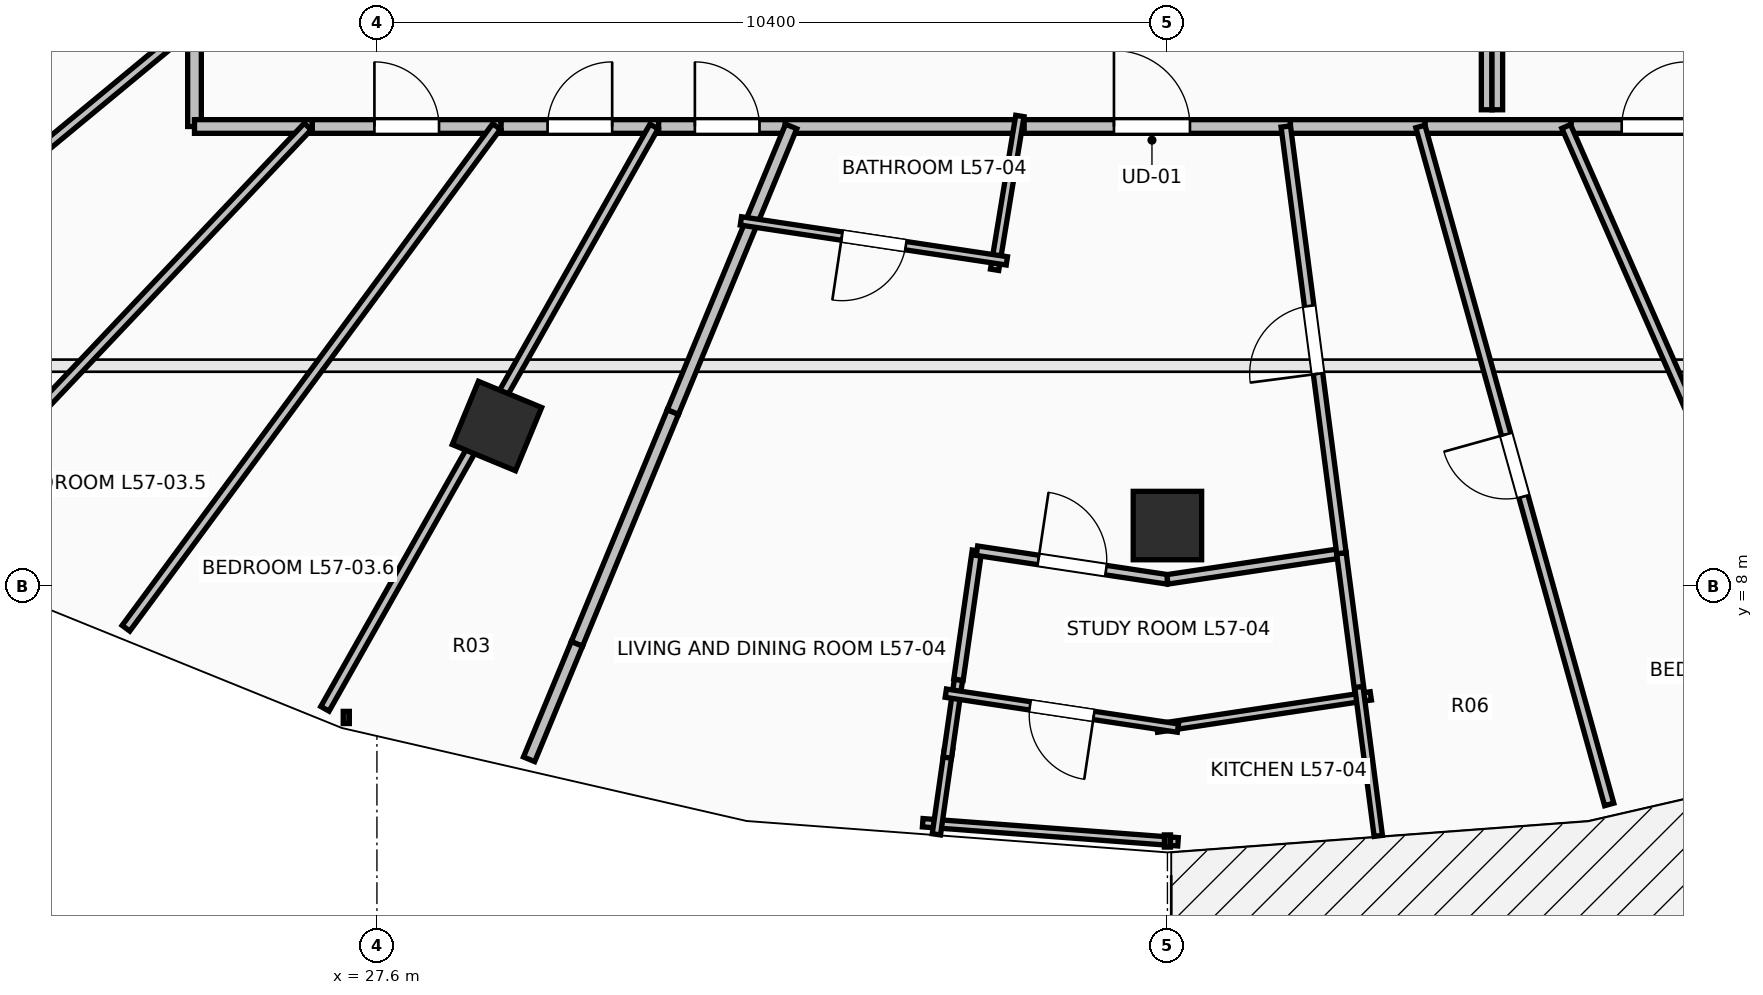
"""IFC4 building model, lengths in metres.
Left out: names, types, materials, properties, quantities, classifications, styles, units other than length and angle.
Written with IfcOpenShell. Run it as: python <this file> out.ifc"""

import sys

from ifc_helpers import new_model, si_unit, direction, frame, frame_2d, origin, origin_2d, place, context, subcontext, project, spatial, rectangle, extrude, element, fill, save


model = new_model("IFC4")
c1 = context("Model", 3, precision=1e-05, world=origin(), true_north=direction((0.0, 1.0)))
c2 = subcontext(c1, "Body", "Model", "MODEL_VIEW")
j1 = project(units=[si_unit("LENGTHUNIT", "METRE"), si_unit("PLANEANGLEUNIT", "RADIAN")], contexts=[c1])
p1 = place(None, origin())
s1 = spatial("IfcSite", under=j1, at=p1, CompositionType="ELEMENT")
p2 = place(p1, origin())
s2 = spatial("IfcBuilding", under=s1, at=p2, CompositionType="ELEMENT")
p3 = place(p2, frame((0.0, 0.0, 210.75)))
s3 = spatial("IfcBuildingStorey", under=s2, at=p3, CompositionType="ELEMENT", Elevation=210.75)
for number, where, z_axis, x_axis in (
    (1, (29.179, 10.109, 0.0), (0.0, 0.0, 1.0), (-0.383, -0.924, 0.0)),
    (2, (38.0, 8.8, 0.0), (0.0, 0.0, 1.0), (0.0, -1.0, 0.0)),
):
    element("IfcColumn", number, at=place(p3, frame(where, z_axis=z_axis, x_axis=x_axis)), inside=s3, PredefinedType="COLUMN", context=c2, shape_type="SweptSolid", body=[
        extrude(rectangle(XDim=0.9, YDim=0.9, at=origin_2d()), origin(), (0.0, 0.0, 1.0), 3.55),
    ])
p4 = place(p3, frame((25.2, 15.333, 0.0), z_axis=(0.0, 0.0, 1.0), x_axis=(0.0, -1.0, 0.0)))
e3 = element("IfcWall", 3, at=p4, inside=s3, PredefinedType="PARTITIONING", context=c2, shape_type="SweptSolid", body=[
    extrude(rectangle(XDim=1.283, YDim=0.18, at=frame_2d((0.642, 0.0))), origin(), (0.0, 0.0, 1.0), 2.482),
])
p5 = place(p3, frame((25.2, 14.05, 0.0), z_axis=(0.0, 0.0, 1.0), x_axis=(1.0, 0.0, 0.0)))
e4 = element("IfcWall", 4, at=p5, inside=s3, PredefinedType="PARTITIONING", context=c2, shape_type="SweptSolid", body=[
    extrude(rectangle(XDim=1.55, YDim=0.18, at=frame_2d((0.775, 0.0))), origin(), (0.0, 0.0, 1.0), 2.936),
])
p6 = place(p3, frame((26.75, 14.05, 0.0), z_axis=(0.0, 0.0, 1.0), x_axis=(1.0, 0.0, 0.0)))
e5 = element("IfcWall", 5, at=p6, inside=s3, PredefinedType="PARTITIONING", context=c2, shape_type="SweptSolid", body=[
    extrude(rectangle(XDim=2.484, YDim=0.18, at=frame_2d((1.242, 0.0))), origin(), (0.0, 0.0, 1.0), 2.482),
])
p7 = place(p6, frame((0.817, 0.0, 0.0)))
e6 = element("IfcOpeningElement", 6, at=p7, cuts=e5, PredefinedType="OPENING", context=c2, shape_type="SweptSolid", body=[
    extrude(rectangle(XDim=0.85, YDim=2.1, at=frame_2d((0.425, 1.05))), frame((0.0, 0.105, 0.0), z_axis=(0.0, -1.0, 0.0), x_axis=(1.0, 0.0, 0.0)), (0.0, 0.0, 1.0), 0.21),
])
p8 = place(p3, frame((29.234, 14.05, 0.0), z_axis=(0.0, 0.0, 1.0), x_axis=(1.0, 0.0, 0.0)))
e7 = element("IfcWall", 7, at=p8, inside=s3, PredefinedType="PARTITIONING", context=c2, shape_type="SweptSolid", body=[
    extrude(rectangle(XDim=2.072, YDim=0.18, at=frame_2d((1.036, 0.0))), origin(), (0.0, 0.0, 1.0), 3.29),
])
p9 = place(p8, frame((0.611, 0.0, 0.0)))
e8 = element("IfcOpeningElement", 8, at=p9, cuts=e7, PredefinedType="OPENING", context=c2, shape_type="SweptSolid", body=[
    extrude(rectangle(XDim=0.85, YDim=2.1, at=frame_2d((0.425, 1.05))), frame((0.0, 0.105, 0.0), z_axis=(0.0, -1.0, 0.0), x_axis=(1.0, 0.0, 0.0)), (0.0, 0.0, 1.0), 0.21),
])
p10 = place(p3, frame((31.306, 14.05, 0.0), z_axis=(0.0, 0.0, 1.0), x_axis=(1.0, 0.0, 0.0)))
e9 = element("IfcWall", 9, at=p10, inside=s3, PredefinedType="PARTITIONING", context=c2, shape_type="SweptSolid", body=[
    extrude(rectangle(XDim=1.804, YDim=0.18, at=frame_2d((0.902, 0.0))), origin(), (0.0, 0.0, 1.0), 3.29),
])
p11 = place(p10, frame((0.477, 0.0, 0.0)))
e10 = element("IfcOpeningElement", 10, at=p11, cuts=e9, PredefinedType="OPENING", context=c2, shape_type="SweptSolid", body=[
    extrude(rectangle(XDim=0.85, YDim=2.1, at=frame_2d((0.425, 1.05))), frame((0.0, 0.105, 0.0), z_axis=(0.0, -1.0, 0.0), x_axis=(1.0, 0.0, 0.0)), (0.0, 0.0, 1.0), 0.21),
])
p12 = place(p3, frame((35.975, 14.05, 0.0), z_axis=(0.0, 0.0, 1.0), x_axis=(1.0, 0.0, 0.0)))
e11 = element("IfcWall", 11, at=p12, inside=s3, PredefinedType="PARTITIONING", context=c2, shape_type="SweptSolid", body=[
    extrude(rectangle(XDim=3.643, YDim=0.18, at=frame_2d((1.821, 0.0))), origin(), (0.0, 0.0, 1.0), 2.979),
])
p13 = place(p12, frame((1.322, 0.0, 0.0)))
e12 = element("IfcOpeningElement", 12, at=p13, cuts=e11, PredefinedType="OPENING", context=c2, shape_type="SweptSolid", body=[
    extrude(rectangle(XDim=1.0, YDim=2.15, at=frame_2d((0.5, 1.075))), frame((0.0, 0.105, 0.0), z_axis=(0.0, -1.0, 0.0), x_axis=(1.0, 0.0, 0.0)), (0.0, 0.0, 1.0), 0.21),
])
p14 = place(p3, frame((32.97, 14.05, 0.0), z_axis=(0.0, 0.0, 1.0), x_axis=(1.0, 0.0, 0.0)))
e13 = element("IfcWall", 13, at=p14, inside=s3, PredefinedType="PARTITIONING", context=c2, shape_type="SweptSolid", body=[
    extrude(rectangle(XDim=3.145, YDim=0.18, at=frame_2d((1.573, 0.0))), origin(), (0.0, 0.0, 1.0), 2.979),
])
p15 = place(p3, frame((39.618, 14.05, 0.0), z_axis=(0.0, 0.0, 1.0), x_axis=(1.0, 0.0, 0.0)))
e14 = element("IfcWall", 14, at=p15, inside=s3, PredefinedType="PARTITIONING", context=c2, shape_type="SweptSolid", body=[
    extrude(rectangle(XDim=1.772, YDim=0.18, at=frame_2d((0.886, 0.0))), origin(), (0.0, 0.0, 1.0), 2.979),
])
p16 = place(p3, frame((41.39, 14.05, 0.0), z_axis=(0.0, 0.0, 1.0), x_axis=(1.0, 0.0, 0.0)))
e15 = element("IfcWall", 15, at=p16, inside=s3, PredefinedType="PARTITIONING", context=c2, shape_type="SweptSolid", body=[
    extrude(rectangle(XDim=1.922, YDim=0.18, at=frame_2d((0.961, 0.0))), origin(), (0.0, 0.0, 1.0), 2.979),
])
p17 = place(p3, frame((43.312, 14.05, 0.0), z_axis=(0.0, 0.0, 1.0), x_axis=(1.0, 0.0, 0.0)))
e16 = element("IfcWall", 16, at=p17, inside=s3, PredefinedType="PARTITIONING", context=c2, shape_type="SweptSolid", body=[
    extrude(rectangle(XDim=2.179, YDim=0.18, at=frame_2d((1.089, 0.0))), origin(), (0.0, 0.0, 1.0), 2.482),
])
p18 = place(p17, frame((0.665, 0.0, 0.0)))
e17 = element("IfcOpeningElement", 17, at=p18, cuts=e16, PredefinedType="OPENING", context=c2, shape_type="SweptSolid", body=[
    extrude(rectangle(XDim=0.85, YDim=2.1, at=frame_2d((0.425, 1.05))), frame((0.0, 0.105, 0.0), z_axis=(0.0, -1.0, 0.0), x_axis=(1.0, 0.0, 0.0)), (0.0, 0.0, 1.0), 0.21),
])
p19 = place(p3, frame((14.217, 14.579, 0.0), z_axis=(0.0, 0.0, 1.0), x_axis=(0.901423599975, 0.432938209689, 0.0)))
e18 = element("IfcWall", 18, at=p19, inside=s3, PredefinedType="PARTITIONING", context=c2, shape_type="SweptSolid", body=[
    extrude(rectangle(XDim=12.184, YDim=0.125, at=frame_2d((6.092, 0.0))), origin(), (0.0, 0.0, 1.0), 2.482),
])
p20 = place(p3, frame((16.555, 12.272, 0.0), z_axis=(0.0, 0.0, 1.0), x_axis=(0.842221721565, 0.539131312135, 0.0)))
e19 = element("IfcWall", 19, at=p20, inside=s3, PredefinedType="PARTITIONING", context=c2, shape_type="SweptSolid", body=[
    extrude(rectangle(XDim=10.265, YDim=0.125, at=frame_2d((5.132, 0.0))), origin(), (0.0, 0.0, 1.0), 2.482),
])
p21 = place(p3, frame((19.02, 10.298, 0.0), z_axis=(0.0, 0.0, 1.0), x_axis=(0.770494327523, 0.637446853671, 0.0)))
e20 = element("IfcWall", 20, at=p21, inside=s3, PredefinedType="PARTITIONING", context=c2, shape_type="SweptSolid", body=[
    extrude(rectangle(XDim=8.021, YDim=0.125, at=frame_2d((4.01, 0.0))), origin(), (0.0, 0.0, 1.0), 2.482),
])
p22 = place(p21, frame((2.746, 0.0, 0.0)))
e21 = element("IfcOpeningElement", 21, at=p22, cuts=e20, PredefinedType="OPENING", context=c2, shape_type="SweptSolid", body=[
    extrude(rectangle(XDim=0.85, YDim=2.1, at=frame_2d((0.425, 1.05))), frame((0.0, 0.077, 0.0), z_axis=(0.0, -1.0, 0.0), x_axis=(1.0, 0.0, 0.0)), (0.0, 0.0, 1.0), 0.155),
])
p23 = place(p3, frame((21.613, 8.686, 0.0), z_axis=(0.0, 0.0, 1.0), x_axis=(0.68740257318, 0.726276601844, 0.0)))
e22 = element("IfcWall", 22, at=p23, inside=s3, PredefinedType="PARTITIONING", context=c2, shape_type="SweptSolid", body=[
    extrude(rectangle(XDim=7.386, YDim=0.125, at=frame_2d((3.693, 0.0))), origin(), (0.0, 0.0, 1.0), 2.824),
])
p24 = place(p3, frame((24.298, 7.449, 0.0), z_axis=(0.0, 0.0, 1.0), x_axis=(0.594148459094, 0.804355399408, 0.0)))
e23 = element("IfcWall", 23, at=p24, inside=s3, PredefinedType="PARTITIONING", context=c2, shape_type="SweptSolid", body=[
    extrude(rectangle(XDim=8.207, YDim=0.125, at=frame_2d((4.103, 0.0))), origin(), (0.0, 0.0, 1.0), 2.482),
])
p25 = place(p3, frame((26.916, 6.389, 0.0), z_axis=(0.0, 0.0, 1.0), x_axis=(0.492046286697, 0.870569039047, 0.0)))
e24 = element("IfcWall", 24, at=p25, inside=s3, PredefinedType="PARTITIONING", context=c2, shape_type="SweptSolid", body=[
    extrude(rectangle(XDim=8.8, YDim=0.125, at=frame_2d((4.4, 0.0))), origin(), (0.0, 0.0, 1.0), 2.482),
])
p26 = place(p3, frame((30.231, 7.243, 0.0), z_axis=(0.0, 0.0, 1.0), x_axis=(0.382467158794, 0.923969086303, 0.0)))
e25 = element("IfcWall", 25, at=p26, inside=s3, PredefinedType="PARTITIONING", context=c2, shape_type="SweptSolid", body=[
    extrude(rectangle(XDim=3.302, YDim=0.16, at=frame_2d((1.651, 0.0))), origin(), (0.0, 0.0, 1.0), 2.824),
])
p27 = place(p3, frame((31.494, 10.294, 0.0), z_axis=(0.0, 0.0, 1.0), x_axis=(0.382751310383, 0.923851413594, 0.0)))
e26 = element("IfcWall", 26, at=p27, inside=s3, PredefinedType="PARTITIONING", context=c2, shape_type="SweptSolid", body=[
    extrude(rectangle(XDim=4.066, YDim=0.16, at=frame_2d((2.033, 0.0))), origin(), (0.0, 0.0, 1.0), 2.936),
])
p28 = place(p3, frame((29.602, 5.725, 0.0), z_axis=(0.0, 0.0, 1.0), x_axis=(0.382789247432, 0.923835695376, 0.0)))
e27 = element("IfcWall", 27, at=p28, inside=s3, PredefinedType="PARTITIONING", context=c2, shape_type="SweptSolid", body=[
    extrude(rectangle(XDim=1.643, YDim=0.16, at=frame_2d((0.822, 0.0))), origin(), (0.0, 0.0, 1.0), 3.29),
])
p29 = place(p3, frame((36.059, 14.188, 0.0), z_axis=(0.0, 0.0, 1.0), x_axis=(-0.16206206721, -0.986780566474, 0.0)))
e28 = element("IfcWall", 28, at=p29, inside=s3, PredefinedType="PARTITIONING", context=c2, shape_type="SweptSolid", body=[
    extrude(rectangle(XDim=2.05, YDim=0.11, at=frame_2d((1.025, 0.0))), origin(), (0.0, 0.0, 1.0), 2.936),
])
p30 = place(p3, frame((35.887, 12.282, 0.0), z_axis=(0.0, 0.0, 1.0), x_axis=(-0.988902415317, 0.148566527121, 0.0)))
e29 = element("IfcWall", 29, at=p30, inside=s3, PredefinedType="PARTITIONING", context=c2, shape_type="SweptSolid", body=[
    extrude(rectangle(XDim=3.538, YDim=0.11, at=frame_2d((1.769, 0.0))), origin(), (0.0, 0.0, 1.0), 2.936),
])
p31 = place(p30, frame((1.344, 0.0, 0.0)))
e30 = element("IfcOpeningElement", 30, at=p31, cuts=e29, PredefinedType="OPENING", context=c2, shape_type="SweptSolid", body=[
    extrude(rectangle(XDim=0.85, YDim=2.1, at=frame_2d((0.425, 1.05))), frame((0.0, 0.07, 0.0), z_axis=(0.0, -1.0, 0.0), x_axis=(1.0, 0.0, 0.0)), (0.0, 0.0, 1.0), 0.14),
])
p32 = place(p3, frame((34.781, 4.89, 0.0), z_axis=(0.0, 0.0, 1.0), x_axis=(0.997225868556, -0.07443498561, 0.0)))
e31 = element("IfcWall", 31, at=p32, inside=s3, PredefinedType="PARTITIONING", context=c2, shape_type="SweptSolid", body=[
    extrude(rectangle(XDim=3.368, YDim=0.11, at=frame_2d((1.684, 0.0))), origin(), (0.0, 0.0, 1.0), 3.29),
])
p33 = place(p3, frame((34.96, 4.737, 0.0), z_axis=(0.0, 0.0, 1.0), x_axis=(0.141118797845, 0.989992669112, 0.0)))
e32 = element("IfcWall", 32, at=p33, inside=s3, PredefinedType="PARTITIONING", context=c2, shape_type="SweptSolid", body=[
    extrude(rectangle(XDim=1.13, YDim=0.11, at=frame_2d((0.565, 0.0))), origin(), (0.0, 0.0, 1.0), 3.29),
])
p34 = place(p3, frame((35.104, 5.747, 0.0), z_axis=(0.0, 0.0, 1.0), x_axis=(0.141751551652, 0.989902266693, 0.0)))
e33 = element("IfcWall", 33, at=p34, inside=s3, PredefinedType="PARTITIONING", context=c2, shape_type="SweptSolid", body=[
    extrude(rectangle(XDim=1.035, YDim=0.11, at=frame_2d((0.518, 0.0))), origin(), (0.0, 0.0, 1.0), 3.29),
])
p35 = place(p3, frame((35.251, 6.771, 0.0), z_axis=(0.0, 0.0, 1.0), x_axis=(0.141660537741, 0.98991529539, 0.0)))
e34 = element("IfcWall", 34, at=p35, inside=s3, PredefinedType="PARTITIONING", context=c2, shape_type="SweptSolid", body=[
    extrude(rectangle(XDim=1.715, YDim=0.125, at=frame_2d((0.857, 0.0))), origin(), (0.0, 0.0, 1.0), 3.29),
])
p36 = place(p3, frame((35.494, 8.469, 0.0), z_axis=(0.0, 0.0, 1.0), x_axis=(0.988876209798, -0.148740854158, 0.0)))
e35 = element("IfcWall", 35, at=p36, inside=s3, PredefinedType="PARTITIONING", context=c2, shape_type="SweptSolid", body=[
    extrude(rectangle(XDim=2.534, YDim=0.125, at=frame_2d((1.267, 0.0))), origin(), (0.0, 0.0, 1.0), 3.29),
])
p37 = place(p36, frame((0.817, 0.0, 0.0)))
e36 = element("IfcOpeningElement", 36, at=p37, cuts=e35, PredefinedType="OPENING", context=c2, shape_type="SweptSolid", body=[
    extrude(rectangle(XDim=0.9, YDim=2.1, at=frame_2d((0.45, 1.05))), frame((0.0, 0.077, 0.0), z_axis=(0.0, -1.0, 0.0), x_axis=(1.0, 0.0, 0.0)), (0.0, 0.0, 1.0), 0.155),
])
p38 = place(p3, frame((38.0, 8.092, 0.0), z_axis=(0.0, 0.0, 1.0), x_axis=(0.988896087956, 0.148608637791, 0.0)))
e37 = element("IfcWall", 37, at=p38, inside=s3, PredefinedType="PARTITIONING", context=c2, shape_type="SweptSolid", body=[
    extrude(rectangle(XDim=2.315, YDim=0.125, at=frame_2d((1.157, 0.0))), origin(), (0.0, 0.0, 1.0), 3.29),
])
p39 = place(p3, frame((40.289, 8.436, 0.0), z_axis=(0.0, 0.0, 1.0), x_axis=(0.12959001093, -0.991567662375, 0.0)))
e38 = element("IfcWall", 38, at=p39, inside=s3, PredefinedType="PARTITIONING", context=c2, shape_type="SweptSolid", body=[
    extrude(rectangle(XDim=1.914, YDim=0.125, at=frame_2d((0.957, 0.0))), origin(), (0.0, 0.0, 1.0), 3.29),
])
p40 = place(p3, frame((40.289, 8.436, 0.0), z_axis=(0.0, 0.0, 1.0), x_axis=(-0.12936683678, 0.991596803919, 0.0)))
e39 = element("IfcWall", 39, at=p40, inside=s3, PredefinedType="PARTITIONING", context=c2, shape_type="SweptSolid", body=[
    extrude(rectangle(XDim=5.662, YDim=0.125, at=frame_2d((2.831, 0.0))), origin(), (0.0, 0.0, 1.0), 2.482),
])
p41 = place(p40, frame((2.381, 0.0, 0.0)))
e40 = element("IfcOpeningElement", 40, at=p41, cuts=e39, PredefinedType="OPENING", context=c2, shape_type="SweptSolid", body=[
    extrude(rectangle(XDim=0.9, YDim=2.1, at=frame_2d((0.45, 1.05))), frame((0.0, 0.077, 0.0), z_axis=(0.0, -1.0, 0.0), x_axis=(1.0, 0.0, 0.0)), (0.0, 0.0, 1.0), 0.155),
])
p42 = place(p3, frame((40.675, 6.559, 0.0), z_axis=(0.0, 0.0, 1.0), x_axis=(-0.988857545323, -0.148864888602, 0.0)))
e41 = element("IfcWall", 41, at=p42, inside=s3, PredefinedType="PARTITIONING", context=c2, shape_type="SweptSolid", body=[
    extrude(rectangle(XDim=2.845, YDim=0.11, at=frame_2d((1.423, 0.0))), origin(), (0.0, 0.0, 1.0), 3.29),
])
p43 = place(p3, frame((38.138, 6.135, 0.0), z_axis=(0.0, 0.0, 1.0), x_axis=(-0.988868983452, 0.148788889259, 0.0)))
e42 = element("IfcWall", 42, at=p43, inside=s3, PredefinedType="PARTITIONING", context=c2, shape_type="SweptSolid", body=[
    extrude(rectangle(XDim=3.088, YDim=0.11, at=frame_2d((1.544, 0.0))), origin(), (0.0, 0.0, 1.0), 3.29),
])
p44 = place(p43, frame((1.119, 0.0, 0.0)))
e43 = element("IfcOpeningElement", 43, at=p44, cuts=e42, PredefinedType="OPENING", context=c2, shape_type="SweptSolid", body=[
    extrude(rectangle(XDim=0.85, YDim=2.1, at=frame_2d((0.425, 1.05))), frame((0.0, 0.07, 0.0), z_axis=(0.0, -1.0, 0.0), x_axis=(1.0, 0.0, 0.0)), (0.0, 0.0, 1.0), 0.14),
])
p45 = place(p3, frame((40.774, 4.717, 0.0), z_axis=(0.0, 0.0, 1.0), x_axis=(-0.129233545587, 0.991614184396, 0.0)))
e44 = element("IfcWall", 44, at=p45, inside=s3, PredefinedType="PARTITIONING", context=c2, shape_type="SweptSolid", body=[
    extrude(rectangle(XDim=1.976, YDim=0.11, at=frame_2d((0.988, 0.0))), origin(), (0.0, 0.0, 1.0), 3.29),
])
p46 = place(p3, frame((43.812, 5.131, 0.0), z_axis=(0.0, 0.0, 1.0), x_axis=(-0.268310216589, 0.963332563383, 0.0)))
e45 = element("IfcWall", 45, at=p46, inside=s3, PredefinedType="PARTITIONING", context=c2, shape_type="SweptSolid", body=[
    extrude(rectangle(XDim=9.259, YDim=0.125, at=frame_2d((4.629, 0.0))), origin(), (0.0, 0.0, 1.0), 2.482),
])
p47 = place(p46, frame((4.204, 0.0, 0.0)))
e46 = element("IfcOpeningElement", 46, at=p47, cuts=e45, PredefinedType="OPENING", context=c2, shape_type="SweptSolid", body=[
    extrude(rectangle(XDim=0.85, YDim=2.1, at=frame_2d((0.425, 1.05))), frame((0.0, 0.077, 0.0), z_axis=(0.0, -1.0, 0.0), x_axis=(1.0, 0.0, 0.0)), (0.0, 0.0, 1.0), 0.155),
])
p48 = place(p3, frame((46.854, 5.829, 0.0), z_axis=(0.0, 0.0, 1.0), x_axis=(-0.401869944724, 0.915696755224, 0.0)))
e47 = element("IfcWall", 47, at=p48, inside=s3, PredefinedType="PARTITIONING", context=c2, shape_type="SweptSolid", body=[
    extrude(rectangle(XDim=8.978, YDim=0.125, at=frame_2d((4.489, 0.0))), origin(), (0.0, 0.0, 1.0), 2.482),
])
for number, where, z_axis, x_axis in (
    (48, (42.2, 16.1, 0.0), (0.0, 0.0, 1.0), (0.0, -1.0, 0.0)),
    (49, (42.34, 14.27, 0.0), (0.0, 0.0, 1.0), (0.0, 1.0, 0.0)),
):
    element("IfcWall", number, at=place(p3, frame(where, z_axis=z_axis, x_axis=x_axis)), inside=s3, PredefinedType="PARTITIONING", context=c2, shape_type="SweptSolid", body=[
        extrude(rectangle(XDim=1.83, YDim=0.14, at=frame_2d((0.915, 0.0))), origin(), (0.0, 0.0, 1.0), 2.979),
    ])
p49 = place(p13, origin())
e50 = element("IfcDoor", 50, at=p49, inside=s3, OperationType="SINGLE_SWING_LEFT", PredefinedType="DOOR", context=c2, shape_type="SweptSolid", body=[
    extrude(rectangle(XDim=1.0, YDim=2.15, at=frame_2d((0.5, 1.075))), frame((0.0, 0.025, 0.0), z_axis=(0.0, -1.0, 0.0), x_axis=(1.0, 0.0, 0.0)), (0.0, 0.0, 1.0), 0.05),
])
fill(e12, e50)
p50 = place(p31, origin())
e51 = element("IfcDoor", 51, at=p50, inside=s3, OperationType="SINGLE_SWING_RIGHT", PredefinedType="DOOR", context=c2, shape_type="SweptSolid", body=[
    extrude(rectangle(XDim=0.85, YDim=2.1, at=frame_2d((0.425, 1.05))), frame((0.0, 0.025, 0.0), z_axis=(0.0, -1.0, 0.0), x_axis=(1.0, 0.0, 0.0)), (0.0, 0.0, 1.0), 0.05),
])
fill(e30, e51)
p51 = place(p37, origin())
e52 = element("IfcDoor", 52, at=p51, inside=s3, OperationType="SINGLE_SWING_LEFT", PredefinedType="DOOR", context=c2, shape_type="SweptSolid", body=[
    extrude(rectangle(XDim=0.9, YDim=2.1, at=frame_2d((0.45, 1.05))), frame((0.0, 0.025, 0.0), z_axis=(0.0, -1.0, 0.0), x_axis=(1.0, 0.0, 0.0)), (0.0, 0.0, 1.0), 0.05),
])
fill(e36, e52)
p52 = place(p41, origin())
e53 = element("IfcDoor", 53, at=p52, inside=s3, OperationType="SINGLE_SWING_LEFT", PredefinedType="DOOR", context=c2, shape_type="SweptSolid", body=[
    extrude(rectangle(XDim=0.9, YDim=2.1, at=frame_2d((0.45, 1.05))), frame((0.0, 0.025, 0.0), z_axis=(0.0, -1.0, 0.0), x_axis=(1.0, 0.0, 0.0)), (0.0, 0.0, 1.0), 0.05),
])
fill(e40, e53)
p53 = place(p7, origin())
e54 = element("IfcDoor", 54, at=p53, inside=s3, OperationType="SINGLE_SWING_LEFT", PredefinedType="DOOR", context=c2, shape_type="SweptSolid", body=[
    extrude(rectangle(XDim=0.85, YDim=2.1, at=frame_2d((0.425, 1.05))), frame((0.0, 0.025, 0.0), z_axis=(0.0, -1.0, 0.0), x_axis=(1.0, 0.0, 0.0)), (0.0, 0.0, 1.0), 0.05),
])
fill(e6, e54)
p54 = place(p9, origin())
e55 = element("IfcDoor", 55, at=p54, inside=s3, OperationType="SINGLE_SWING_RIGHT", PredefinedType="DOOR", context=c2, shape_type="SweptSolid", body=[
    extrude(rectangle(XDim=0.85, YDim=2.1, at=frame_2d((0.425, 1.05))), frame((0.0, 0.025, 0.0), z_axis=(0.0, -1.0, 0.0), x_axis=(1.0, 0.0, 0.0)), (0.0, 0.0, 1.0), 0.05),
])
fill(e8, e55)
p55 = place(p11, origin())
e56 = element("IfcDoor", 56, at=p55, inside=s3, OperationType="SINGLE_SWING_LEFT", PredefinedType="DOOR", context=c2, shape_type="SweptSolid", body=[
    extrude(rectangle(XDim=0.85, YDim=2.1, at=frame_2d((0.425, 1.05))), frame((0.0, 0.025, 0.0), z_axis=(0.0, -1.0, 0.0), x_axis=(1.0, 0.0, 0.0)), (0.0, 0.0, 1.0), 0.05),
])
fill(e10, e56)
p56 = place(p18, origin())
e57 = element("IfcDoor", 57, at=p56, inside=s3, OperationType="SINGLE_SWING_RIGHT", PredefinedType="DOOR", context=c2, shape_type="SweptSolid", body=[
    extrude(rectangle(XDim=0.85, YDim=2.1, at=frame_2d((0.425, 1.05))), frame((0.0, 0.025, 0.0), z_axis=(0.0, -1.0, 0.0), x_axis=(1.0, 0.0, 0.0)), (0.0, 0.0, 1.0), 0.05),
])
fill(e17, e57)
p57 = place(p44, origin())
e58 = element("IfcDoor", 58, at=p57, inside=s3, OperationType="SINGLE_SWING_LEFT", PredefinedType="DOOR", context=c2, shape_type="SweptSolid", body=[
    extrude(rectangle(XDim=0.85, YDim=2.1, at=frame_2d((0.425, 1.05))), frame((0.0, 0.025, 0.0), z_axis=(0.0, -1.0, 0.0), x_axis=(1.0, 0.0, 0.0)), (0.0, 0.0, 1.0), 0.05),
])
fill(e43, e58)
p58 = place(p47, origin())
e59 = element("IfcDoor", 59, at=p58, inside=s3, OperationType="SINGLE_SWING_RIGHT", PredefinedType="DOOR", context=c2, shape_type="SweptSolid", body=[
    extrude(rectangle(XDim=0.85, YDim=2.1, at=frame_2d((0.425, 1.05))), frame((0.0, 0.025, 0.0), z_axis=(0.0, -1.0, 0.0), x_axis=(1.0, 0.0, 0.0)), (0.0, 0.0, 1.0), 0.05),
])
fill(e46, e59)
save(model, sys.argv[1])
